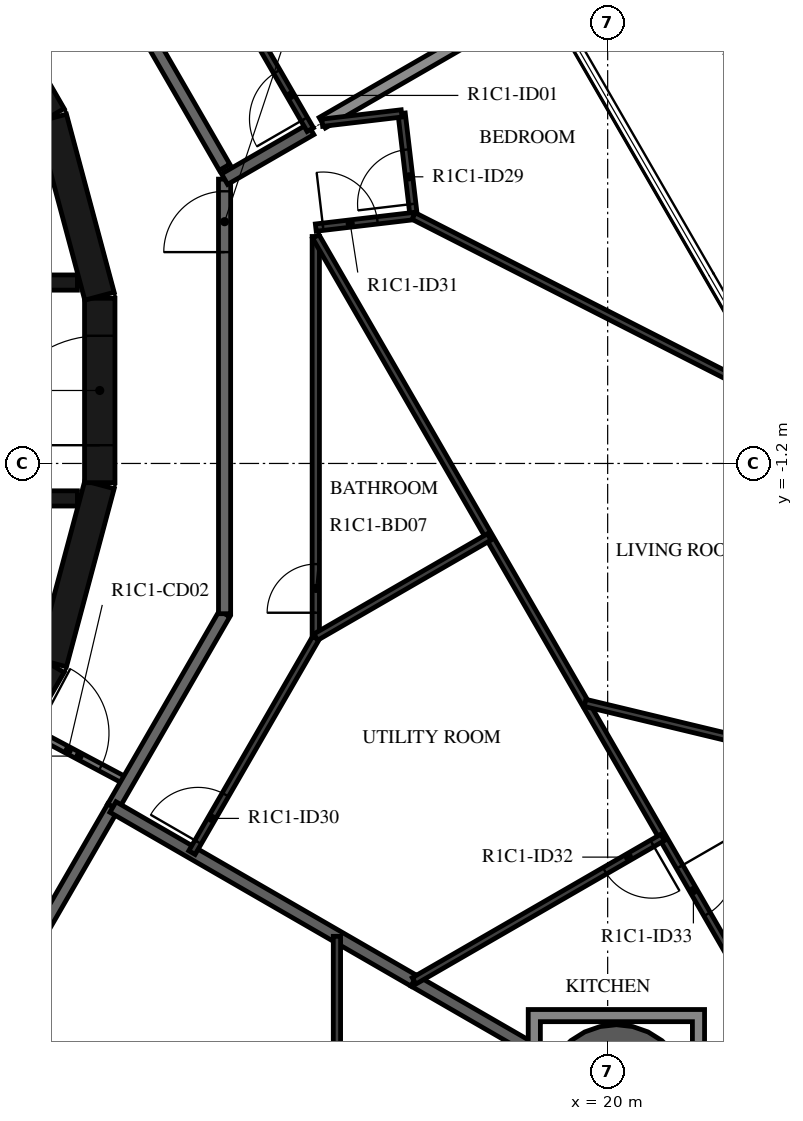
"""IFC4 building model, lengths in metres.
Left out: names, types, materials, properties, quantities, classifications, styles, units other than length and angle.
Written with IfcOpenShell. Run it as: python <this file> out.ifc"""

import sys

from ifc_helpers import new_model, si_unit, direction, frame, frame_2d, origin, origin_2d, place, context, subcontext, project, spatial, polyline, rectangle, hollow_circle, outline, extrude, element, fill, save


model = new_model("IFC4")
c1 = context("Model", 3, precision=1e-05, world=origin(), true_north=direction((0.0, 1.0)))
c2 = subcontext(c1, "Body", "Model", "MODEL_VIEW")
j1 = project(units=[si_unit("LENGTHUNIT", "METRE"), si_unit("PLANEANGLEUNIT", "RADIAN")], contexts=[c1])
p1 = place(None, origin())
s1 = spatial("IfcSite", under=j1, at=p1, CompositionType="ELEMENT")
p2 = place(p1, origin())
s2 = spatial("IfcBuilding", under=s1, at=p2, CompositionType="ELEMENT")
p3 = place(p2, frame((0.0, 0.0, 62.9)))
s3 = spatial("IfcBuildingStorey", under=s2, at=p3, CompositionType="ELEMENT", Elevation=62.9)
p4 = place(p3, frame((20.144, -11.63, -0.38), z_axis=(0.0, 0.0, 1.0), x_axis=(1.0, 0.0, 0.0)))
e1 = element("IfcColumn", 1, at=p4, inside=s3, PredefinedType="COLUMN", context=c2, shape_type="SweptSolid", body=[
    extrude(hollow_circle(Radius=1.2, WallThickness=0.06, at=origin_2d()), origin(), (0.0, 0.0, 1.0), 3.5),
])
for number, where, z_axis, x_axis in (
    (2, (9.329, -7.137, 0.0), (0.0, 0.0, 1.0), (0.5, 0.866, 0.0)),
    (3, (10.858, -4.479, 0.0), (0.0, 0.0, 1.0), (0.259, 0.966, 0.0)),
):
    element("IfcWall", number, at=place(p3, frame(where, z_axis=z_axis, x_axis=x_axis)), inside=s3, PredefinedType="SHEAR", context=c2, shape_type="SweptSolid", body=[
        extrude(rectangle(XDim=3.033, YDim=0.5, at=frame_2d((1.516, 0.0))), origin(), (0.0, 0.0, 1.0), 3.12),
    ])
p5 = place(p3, frame((11.647, -1.516, 0.0), z_axis=(0.0, 0.0, 1.0), x_axis=(0.0, 1.0, 0.0)))
e4 = element("IfcWall", 4, at=p5, inside=s3, PredefinedType="SHEAR", context=c2, shape_type="SweptSolid", body=[
    extrude(rectangle(XDim=3.033, YDim=0.5, at=frame_2d((1.516, 0.0))), origin(), (0.0, 0.0, 1.0), 3.12),
])
p6 = place(p5, frame((0.616, 0.0, 0.0)))
e5 = element("IfcOpeningElement", 5, at=p6, cuts=e4, PredefinedType="OPENING", context=c2, shape_type="SweptSolid", body=[
    extrude(rectangle(XDim=1.8, YDim=2.1, at=frame_2d((0.9, 1.05))), frame((0.0, 0.26, 0.0), z_axis=(0.0, -1.0, 0.0), x_axis=(1.0, 0.0, 0.0)), (0.0, 0.0, 1.0), 0.52),
])
for number, where, z_axis, x_axis in (
    (6, (11.643, 1.55, 0.0), (0.0, 0.0, 1.0), (-0.259, 0.966, 0.0)),
    (7, (10.845, 4.51, 0.0), (0.0, 0.0, 1.0), (-0.5, 0.866, 0.0)),
):
    element("IfcWall", number, at=place(p3, frame(where, z_axis=z_axis, x_axis=x_axis)), inside=s3, PredefinedType="SHEAR", context=c2, shape_type="SweptSolid", body=[
        extrude(rectangle(XDim=3.033, YDim=0.5, at=frame_2d((1.516, 0.0))), origin(), (0.0, 0.0, 1.0), 3.12),
    ])
p7 = place(p3, frame((3.35, 1.775, 0.0), z_axis=(0.0, 0.0, 1.0), x_axis=(1.0, 0.0, 0.0)))
e8 = element("IfcWall", 8, at=p7, inside=s3, PredefinedType="SHEAR", context=c2, shape_type="SweptSolid", body=[
    extrude(rectangle(XDim=7.93, YDim=0.25, at=frame_2d((3.965, 0.0))), origin(), (0.0, 0.0, 1.0), 3.12),
])
p8 = place(p7, frame((0.35, 0.0, 0.0)))
e9 = element("IfcOpeningElement", 9, at=p8, cuts=e8, PredefinedType="OPENING", context=c2, shape_type="SweptSolid", body=[
    extrude(rectangle(XDim=1.2, YDim=2.4, at=frame_2d((0.6, 1.2))), frame((0.0, 0.135, 0.0), z_axis=(0.0, -1.0, 0.0), x_axis=(1.0, 0.0, 0.0)), (0.0, 0.0, 1.0), 0.27),
])
p9 = place(p7, frame((2.5, 0.0, 0.0)))
e10 = element("IfcOpeningElement", 10, at=p9, cuts=e8, PredefinedType="OPENING", context=c2, shape_type="SweptSolid", body=[
    extrude(rectangle(XDim=1.2, YDim=2.4, at=frame_2d((0.6, 1.2))), frame((0.0, 0.135, 0.0), z_axis=(0.0, -1.0, 0.0), x_axis=(1.0, 0.0, 0.0)), (0.0, 0.0, 1.0), 0.27),
])
p10 = place(p7, frame((4.8, 0.0, 0.0)))
e11 = element("IfcOpeningElement", 11, at=p10, cuts=e8, PredefinedType="OPENING", context=c2, shape_type="SweptSolid", body=[
    extrude(rectangle(XDim=0.9, YDim=2.1, at=frame_2d((0.45, 1.05))), frame((0.0, 0.135, 0.0), z_axis=(0.0, -1.0, 0.0), x_axis=(1.0, 0.0, 0.0)), (0.0, 0.0, 1.0), 0.27),
])
p11 = place(p3, frame((3.35, -1.775, 0.0), z_axis=(0.0, 0.0, 1.0), x_axis=(1.0, 0.0, 0.0)))
e12 = element("IfcWall", 12, at=p11, inside=s3, PredefinedType="SHEAR", context=c2, shape_type="SweptSolid", body=[
    extrude(rectangle(XDim=7.93, YDim=0.25, at=frame_2d((3.965, 0.0))), origin(), (0.0, 0.0, 1.0), 3.12),
])
p12 = place(p11, frame((0.4, 0.0, 0.0)))
e13 = element("IfcOpeningElement", 13, at=p12, cuts=e12, PredefinedType="OPENING", context=c2, shape_type="SweptSolid", body=[
    extrude(rectangle(XDim=1.1, YDim=2.4, at=frame_2d((0.55, 1.2))), frame((0.0, 0.135, 0.0), z_axis=(0.0, -1.0, 0.0), x_axis=(1.0, 0.0, 0.0)), (0.0, 0.0, 1.0), 0.27),
])
p13 = place(p11, frame((2.55, 0.0, 0.0)))
e14 = element("IfcOpeningElement", 14, at=p13, cuts=e12, PredefinedType="OPENING", context=c2, shape_type="SweptSolid", body=[
    extrude(rectangle(XDim=1.1, YDim=2.4, at=frame_2d((0.55, 1.2))), frame((0.0, 0.135, 0.0), z_axis=(0.0, -1.0, 0.0), x_axis=(1.0, 0.0, 0.0)), (0.0, 0.0, 1.0), 0.27),
])
p14 = place(p11, frame((4.7, 0.0, 0.0)))
e15 = element("IfcOpeningElement", 15, at=p14, cuts=e12, PredefinedType="OPENING", context=c2, shape_type="SweptSolid", body=[
    extrude(rectangle(XDim=1.1, YDim=2.4, at=frame_2d((0.55, 1.2))), frame((0.0, 0.135, 0.0), z_axis=(0.0, -1.0, 0.0), x_axis=(1.0, 0.0, 0.0)), (0.0, 0.0, 1.0), 0.27),
])
p15 = place(p3, frame((10.511, -5.589, 0.0), z_axis=(0.0, 0.0, 1.0), x_axis=(0.88294043061, -0.469485032769, 0.0)))
e16 = element("IfcWall", 16, at=p15, inside=s3, PredefinedType="PARTITIONING", context=c2, shape_type="SweptSolid", body=[
    extrude(rectangle(XDim=1.804, YDim=0.12, at=frame_2d((0.902, 0.0))), origin(), (0.0, 0.0, 1.0), 3.12),
])
p16 = place(p15, frame((0.1, 0.0, 0.0)))
e17 = element("IfcOpeningElement", 17, at=p16, cuts=e16, PredefinedType="OPENING", context=c2, shape_type="SweptSolid", body=[
    extrude(rectangle(XDim=1.2, YDim=2.1, at=frame_2d((0.6, 1.05))), frame((0.0, 0.07, 0.0), z_axis=(0.0, -1.0, 0.0), x_axis=(1.0, 0.0, 0.0)), (0.0, 0.0, 1.0), 0.14),
])
p17 = place(p3, frame((13.7, 3.671, 0.0), z_axis=(0.0, 0.0, 1.0), x_axis=(-0.500001669485, 0.866024439905, 0.0)))
e18 = element("IfcWall", 18, at=p17, inside=s3, PredefinedType="STANDARD", context=c2, shape_type="SweptSolid", body=[
    extrude(rectangle(XDim=7.342, YDim=0.2, at=frame_2d((3.671, 0.0))), origin(), (0.0, 0.0, 1.0), 3.12),
])
p18 = place(p17, frame((6.142, 0.0, 0.0)))
e19 = element("IfcOpeningElement", 19, at=p18, cuts=e18, PredefinedType="OPENING", context=c2, shape_type="SweptSolid", body=[
    extrude(rectangle(XDim=1.0, YDim=2.1, at=frame_2d((0.5, 1.05))), frame((0.0, 0.11, 0.0), z_axis=(0.0, -1.0, 0.0), x_axis=(1.0, 0.0, 0.0)), (0.0, 0.0, 1.0), 0.22),
])
p19 = place(p3, frame((11.865, -6.85, 0.0), z_axis=(0.0, 0.0, 1.0), x_axis=(0.499987270552, 0.86603275301, 0.0)))
e20 = element("IfcWall", 20, at=p19, inside=s3, PredefinedType="STANDARD", context=c2, shape_type="SweptSolid", body=[
    extrude(rectangle(XDim=3.671, YDim=0.2, at=frame_2d((1.835, 0.0))), origin(), (0.0, 0.0, 1.0), 3.12),
])
p20 = place(p3, frame((13.7, -3.671, 0.0), z_axis=(0.0, 0.0, 1.0), x_axis=(0.0, 1.0, 0.0)))
e21 = element("IfcWall", 21, at=p20, inside=s3, PredefinedType="STANDARD", context=c2, shape_type="SweptSolid", body=[
    extrude(rectangle(XDim=7.146, YDim=0.2, at=frame_2d((3.573, 0.0))), origin(), (0.0, 0.0, 1.0), 3.12),
])
p21 = place(p20, frame((5.947, 0.0, 0.0)))
e22 = element("IfcOpeningElement", 22, at=p21, cuts=e21, PredefinedType="OPENING", context=c2, shape_type="SweptSolid", body=[
    extrude(rectangle(XDim=1.0, YDim=2.1, at=frame_2d((0.5, 1.05))), frame((0.0, 0.11, 0.0), z_axis=(0.0, -1.0, 0.0), x_axis=(1.0, 0.0, 0.0)), (0.0, 0.0, 1.0), 0.22),
])
p22 = place(p3, frame((10.029, -10.029, 0.0), z_axis=(0.0, 0.0, 1.0), x_axis=(0.50001606911, 0.866016126081, 0.0)))
e23 = element("IfcWall", 23, at=p22, inside=s3, PredefinedType="STANDARD", context=c2, shape_type="SweptSolid", body=[
    extrude(rectangle(XDim=3.671, YDim=0.2, at=frame_2d((1.835, 0.0))), origin(), (0.0, 0.0, 1.0), 3.12),
])
p23 = place(p3, frame((13.7, 3.476, 0.0), z_axis=(0.0, 0.0, 1.0), x_axis=(0.866014281772, 0.500019263395, 0.0)))
e24 = element("IfcWall", 24, at=p23, inside=s3, PredefinedType="STANDARD", context=c2, shape_type="SweptSolid", body=[
    extrude(rectangle(XDim=1.638, YDim=0.2, at=frame_2d((0.819, 0.0))), origin(), (0.0, 0.0, 1.0), 3.12),
])
p24 = place(p3, frame((15.306, 4.403, 0.0), z_axis=(0.0, 0.0, 1.0), x_axis=(0.866013143551, 0.500021234745, 0.0)))
e25 = element("IfcWall", 25, at=p24, inside=s3, PredefinedType="STANDARD", context=c2, shape_type="SweptSolid", body=[
    extrude(rectangle(XDim=4.173, YDim=0.2, at=frame_2d((2.086, 0.0))), origin(), (0.0, 0.0, 1.0), 2.73),
])
p25 = place(p3, frame((16.817, -9.709, 0.0), z_axis=(0.0, 0.0, 1.0), x_axis=(-0.86604338933, 0.499968846828, 0.0)))
e26 = element("IfcWall", 26, at=p25, inside=s3, PredefinedType="STANDARD", context=c2, shape_type="SweptSolid", body=[
    extrude(rectangle(XDim=5.718, YDim=0.2, at=frame_2d((2.859, 0.0))), origin(), (0.0, 0.0, 1.0), 3.12),
])
p26 = place(p3, frame((18.694, -10.793, 0.0), z_axis=(0.0, 0.0, 1.0), x_axis=(-0.866009251978, 0.500027974705, 0.0)))
e27 = element("IfcWall", 27, at=p26, inside=s3, PredefinedType="STANDARD", context=c2, shape_type="SweptSolid", body=[
    extrude(rectangle(XDim=2.167, YDim=0.2, at=frame_2d((1.084, 0.0))), origin(), (0.0, 0.0, 1.0), 3.12),
])
p27 = place(p3, frame((15.11, 4.289, 0.0), z_axis=(0.0, 0.0, 1.0), x_axis=(-0.500033654285, 0.866005972602, 0.0)))
e28 = element("IfcWall", 28, at=p27, inside=s3, PredefinedType="PARTITIONING", context=c2, shape_type="SweptSolid", body=[
    extrude(rectangle(XDim=5.003, YDim=0.12, at=frame_2d((2.501, 0.0))), origin(), (0.0, 0.0, 1.0), 3.12),
])
p28 = place(p27, frame((0.2, 0.0, 0.0)))
e29 = element("IfcOpeningElement", 29, at=p28, cuts=e28, PredefinedType="OPENING", context=c2, shape_type="SweptSolid", body=[
    extrude(rectangle(XDim=0.9, YDim=2.1, at=frame_2d((0.45, 1.05))), frame((0.0, 0.07, 0.0), z_axis=(0.0, -1.0, 0.0), x_axis=(1.0, 0.0, 0.0)), (0.0, 0.0, 1.0), 0.14),
])
p29 = place(p3, frame((15.548, -15.23, 0.0), z_axis=(0.0, 0.0, 1.0), x_axis=(0.0, 1.0, 0.0)))
e30 = element("IfcWall", 30, at=p29, inside=s3, PredefinedType="PARTITIONING", context=c2, shape_type="SweptSolid", body=[
    extrude(rectangle(XDim=6.253, YDim=0.12, at=frame_2d((3.127, 0.0))), origin(), (0.0, 0.0, 1.0), 3.12),
])
p30 = place(p29, frame((0.2, 0.0, 0.0)))
e31 = element("IfcOpeningElement", 31, at=p30, cuts=e30, PredefinedType="OPENING", context=c2, shape_type="SweptSolid", body=[
    extrude(rectangle(XDim=0.9, YDim=2.1, at=frame_2d((0.45, 1.05))), frame((0.0, 0.07, 0.0), z_axis=(0.0, -1.0, 0.0), x_axis=(1.0, 0.0, 0.0)), (0.0, 0.0, 1.0), 0.14),
])
p31 = place(p3, frame((16.81, 2.868, 0.0), z_axis=(0.0, 0.0, 1.0), x_axis=(-0.117049566217, 0.993126074096, 0.0)))
e32 = element("IfcWall", 32, at=p31, inside=s3, PredefinedType="PARTITIONING", context=c2, shape_type="SweptSolid", body=[
    extrude(rectangle(XDim=1.7, YDim=0.12, at=frame_2d((0.85, 0.0))), origin(), (0.0, 0.0, 1.0), 3.12),
])
p32 = place(p31, frame((0.2, 0.0, 0.0)))
e33 = element("IfcOpeningElement", 33, at=p32, cuts=e32, PredefinedType="OPENING", context=c2, shape_type="SweptSolid", body=[
    extrude(rectangle(XDim=0.9, YDim=2.1, at=frame_2d((0.45, 1.05))), frame((0.0, 0.07, 0.0), z_axis=(0.0, -1.0, 0.0), x_axis=(1.0, 0.0, 0.0)), (0.0, 0.0, 1.0), 0.14),
])
p33 = place(p3, frame((16.611, 4.556, 0.0), z_axis=(0.0, 0.0, 1.0), x_axis=(-0.993151872114, -0.116830470836, 0.0)))
e34 = element("IfcWall", 34, at=p33, inside=s3, PredefinedType="PARTITIONING", context=c2, shape_type="SweptSolid", body=[
    extrude(rectangle(XDim=1.314, YDim=0.12, at=frame_2d((0.657, 0.0))), origin(), (0.0, 0.0, 1.0), 3.12),
])
p34 = place(p3, frame((13.164, -7.6, 0.0), z_axis=(0.0, 0.0, 1.0), x_axis=(0.499974973053, 0.866039852617, 0.0)))
e35 = element("IfcWall", 35, at=p34, inside=s3, PredefinedType="PARTITIONING", context=c2, shape_type="SweptSolid", body=[
    extrude(rectangle(XDim=4.073, YDim=0.12, at=frame_2d((2.037, 0.0))), origin(), (0.0, 0.0, 1.0), 3.12),
])
p35 = place(p34, frame((0.2, 0.0, 0.0)))
e36 = element("IfcOpeningElement", 36, at=p35, cuts=e35, PredefinedType="OPENING", context=c2, shape_type="SweptSolid", body=[
    extrude(rectangle(XDim=0.9, YDim=2.1, at=frame_2d((0.45, 1.05))), frame((0.0, 0.07, 0.0), z_axis=(0.0, -1.0, 0.0), x_axis=(1.0, 0.0, 0.0)), (0.0, 0.0, 1.0), 0.14),
])
p36 = place(p3, frame((15.2, 2.679, 0.0), z_axis=(0.0, 0.0, 1.0), x_axis=(0.993150604323, 0.116841247567, 0.0)))
e37 = element("IfcWall", 37, at=p36, inside=s3, PredefinedType="PARTITIONING", context=c2, shape_type="SweptSolid", body=[
    extrude(rectangle(XDim=1.621, YDim=0.12, at=frame_2d((0.811, 0.0))), origin(), (0.0, 0.0, 1.0), 3.12),
])
p37 = place(p36, frame((0.12, 0.0, 0.0)))
e38 = element("IfcOpeningElement", 38, at=p37, cuts=e37, PredefinedType="OPENING", context=c2, shape_type="SweptSolid", body=[
    extrude(rectangle(XDim=0.9, YDim=2.1, at=frame_2d((0.45, 1.05))), frame((0.0, 0.07, 0.0), z_axis=(0.0, -1.0, 0.0), x_axis=(1.0, 0.0, 0.0)), (0.0, 0.0, 1.0), 0.14),
])
p38 = place(p3, frame((15.2, -4.055, 0.0), z_axis=(0.0, 0.0, 1.0), x_axis=(0.0, 1.0, 0.0)))
e39 = element("IfcWall", 39, at=p38, inside=s3, PredefinedType="PARTITIONING", context=c2, shape_type="SweptSolid", body=[
    extrude(rectangle(XDim=6.588, YDim=0.12, at=frame_2d((3.294, 0.0))), origin(), (0.0, 0.0, 1.0), 3.12),
])
p39 = place(p38, frame((0.4, 0.0, 0.0)))
e40 = element("IfcOpeningElement", 40, at=p39, cuts=e39, PredefinedType="OPENING", context=c2, shape_type="SweptSolid", body=[
    extrude(rectangle(XDim=0.8, YDim=2.1, at=frame_2d((0.4, 1.05))), frame((0.0, 0.07, 0.0), z_axis=(0.0, -1.0, 0.0), x_axis=(1.0, 0.0, 0.0)), (0.0, 0.0, 1.0), 0.14),
])
p40 = place(p3, frame((16.81, 2.868, 0.0), z_axis=(0.0, 0.0, 1.0), x_axis=(0.891097252128, -0.453812392128, 0.0)))
e41 = element("IfcWall", 41, at=p40, inside=s3, PredefinedType="PARTITIONING", context=c2, shape_type="SweptSolid", body=[
    extrude(rectangle(XDim=6.677, YDim=0.12, at=frame_2d((3.338, 0.0))), origin(), (0.0, 0.0, 1.0), 3.12),
])
p41 = place(p3, frame((15.2, 2.533, 0.0), z_axis=(0.0, 0.0, 1.0), x_axis=(0.500001127339, -0.866024752914, 0.0)))
e42 = element("IfcWall", 42, at=p41, inside=s3, PredefinedType="PARTITIONING", context=c2, shape_type="SweptSolid", body=[
    extrude(rectangle(XDim=14.434, YDim=0.12, at=frame_2d((7.217, 0.0))), origin(), (0.0, 0.0, 1.0), 3.12),
])
p42 = place(p41, frame((11.97, 0.0, 0.0)))
e43 = element("IfcOpeningElement", 43, at=p42, cuts=e42, PredefinedType="OPENING", context=c2, shape_type="SweptSolid", body=[
    extrude(rectangle(XDim=0.9, YDim=2.1, at=frame_2d((0.45, 1.05))), frame((0.0, 0.07, 0.0), z_axis=(0.0, -1.0, 0.0), x_axis=(1.0, 0.0, 0.0)), (0.0, 0.0, 1.0), 0.14),
])
p43 = place(p3, frame((20.905, -7.349, 0.0), z_axis=(0.0, 0.0, 1.0), x_axis=(-0.866032292145, -0.49998806882, 0.0)))
e44 = element("IfcWall", 44, at=p43, inside=s3, PredefinedType="PARTITIONING", context=c2, shape_type="SweptSolid", body=[
    extrude(rectangle(XDim=4.721, YDim=0.12, at=frame_2d((2.36, 0.0))), origin(), (0.0, 0.0, 1.0), 3.12),
])
p44 = place(p43, frame((0.2, 0.0, 0.0)))
e45 = element("IfcOpeningElement", 45, at=p44, cuts=e44, PredefinedType="OPENING", context=c2, shape_type="SweptSolid", body=[
    extrude(rectangle(XDim=0.9, YDim=2.1, at=frame_2d((0.45, 1.05))), frame((0.0, 0.07, 0.0), z_axis=(0.0, -1.0, 0.0), x_axis=(1.0, 0.0, 0.0)), (0.0, 0.0, 1.0), 0.14),
])
p45 = place(p3, frame((18.052, -2.408, 0.0), z_axis=(0.0, 0.0, 1.0), x_axis=(-0.866017718408, -0.500013311227, 0.0)))
e46 = element("IfcWall", 46, at=p45, inside=s3, PredefinedType="PARTITIONING", context=c2, shape_type="SweptSolid", body=[
    extrude(rectangle(XDim=3.294, YDim=0.12, at=frame_2d((1.647, 0.0))), origin(), (0.0, 0.0, 1.0), 3.12),
])
p46 = place(p3, frame((26.6, -6.813, 0.0), z_axis=(0.0, 0.0, 1.0), x_axis=(-0.972307508101, 0.23370517686, 0.0)))
e47 = element("IfcWall", 47, at=p46, inside=s3, PredefinedType="PARTITIONING", context=c2, shape_type="SweptSolid", body=[
    extrude(rectangle(XDim=7.17, YDim=0.12, at=frame_2d((3.585, 0.0))), origin(), (0.0, 0.0, 1.0), 3.12),
])
p47 = place(p3, origin())
e48 = element("IfcWall", 48, at=p47, inside=s3, PredefinedType="STANDARD", context=c2, shape_type="SweptSolid", body=[
    extrude(outline(polyline([(21.594, -10.18), (21.594, -13.08), (18.694, -13.08), (18.694, -10.18), (21.594, -10.18)]), holes=[polyline([(18.894, -12.88), (21.394, -12.88), (21.394, -10.38), (18.894, -10.38), (18.894, -12.88)])]), origin(), (0.0, 0.0, 1.0), 3.12),
])
p48 = place(p6, origin())
e49 = element("IfcDoor", 49, at=p48, inside=s3, OperationType="DOUBLE_DOOR_SINGLE_SWING", PredefinedType="DOOR", context=c2, shape_type="SweptSolid", body=[
    extrude(rectangle(XDim=1.8, YDim=2.1, at=frame_2d((0.9, 1.05))), frame((0.0, 0.025, 0.0), z_axis=(0.0, -1.0, 0.0), x_axis=(1.0, 0.0, 0.0)), (0.0, 0.0, 1.0), 0.05),
])
fill(e5, e49)
p49 = place(p28, origin())
e50 = element("IfcDoor", 50, at=p49, inside=s3, OperationType="SINGLE_SWING_LEFT", PredefinedType="DOOR", context=c2, shape_type="SweptSolid", body=[
    extrude(rectangle(XDim=0.9, YDim=2.1, at=frame_2d((0.45, 1.05))), frame((0.0, 0.025, 0.0), z_axis=(0.0, -1.0, 0.0), x_axis=(1.0, 0.0, 0.0)), (0.0, 0.0, 1.0), 0.05),
])
fill(e29, e50)
p50 = place(p21, origin())
e51 = element("IfcDoor", 51, at=p50, inside=s3, OperationType="SINGLE_SWING_LEFT", PredefinedType="DOOR", context=c2, shape_type="SweptSolid", body=[
    extrude(rectangle(XDim=1.0, YDim=2.1, at=frame_2d((0.5, 1.05))), frame((0.0, 0.025, 0.0), z_axis=(0.0, -1.0, 0.0), x_axis=(1.0, 0.0, 0.0)), (0.0, 0.0, 1.0), 0.05),
])
fill(e22, e51)
p51 = place(p32, origin())
e52 = element("IfcDoor", 52, at=p51, inside=s3, OperationType="SINGLE_SWING_LEFT", PredefinedType="DOOR", context=c2, shape_type="SweptSolid", body=[
    extrude(rectangle(XDim=0.9, YDim=2.1, at=frame_2d((0.45, 1.05))), frame((0.0, 0.025, 0.0), z_axis=(0.0, -1.0, 0.0), x_axis=(1.0, 0.0, 0.0)), (0.0, 0.0, 1.0), 0.05),
])
fill(e33, e52)
p52 = place(p35, origin())
e53 = element("IfcDoor", 53, at=p52, inside=s3, OperationType="SINGLE_SWING_LEFT", PredefinedType="DOOR", context=c2, shape_type="SweptSolid", body=[
    extrude(rectangle(XDim=0.9, YDim=2.1, at=frame_2d((0.45, 1.05))), frame((0.0, 0.025, 0.0), z_axis=(0.0, -1.0, 0.0), x_axis=(1.0, 0.0, 0.0)), (0.0, 0.0, 1.0), 0.05),
])
fill(e36, e53)
p53 = place(p37, origin())
e54 = element("IfcDoor", 54, at=p53, inside=s3, OperationType="SINGLE_SWING_RIGHT", PredefinedType="DOOR", context=c2, shape_type="SweptSolid", body=[
    extrude(rectangle(XDim=0.9, YDim=2.1, at=frame_2d((0.45, 1.05))), frame((0.0, 0.025, 0.0), z_axis=(0.0, -1.0, 0.0), x_axis=(1.0, 0.0, 0.0)), (0.0, 0.0, 1.0), 0.05),
])
fill(e38, e54)
p54 = place(p39, origin())
e55 = element("IfcDoor", 55, at=p54, inside=s3, OperationType="SINGLE_SWING_LEFT", PredefinedType="DOOR", context=c2, shape_type="SweptSolid", body=[
    extrude(rectangle(XDim=0.8, YDim=2.1, at=frame_2d((0.4, 1.05))), frame((0.0, 0.025, 0.0), z_axis=(0.0, -1.0, 0.0), x_axis=(1.0, 0.0, 0.0)), (0.0, 0.0, 1.0), 0.05),
])
fill(e40, e55)
p55 = place(p44, origin())
e56 = element("IfcDoor", 56, at=p55, inside=s3, OperationType="SINGLE_SWING_LEFT", PredefinedType="DOOR", context=c2, shape_type="SweptSolid", body=[
    extrude(rectangle(XDim=0.9, YDim=2.1, at=frame_2d((0.45, 1.05))), frame((0.0, 0.025, 0.0), z_axis=(0.0, -1.0, 0.0), x_axis=(1.0, 0.0, 0.0)), (0.0, 0.0, 1.0), 0.05),
])
fill(e45, e56)
p56 = place(p42, origin())
e57 = element("IfcDoor", 57, at=p56, inside=s3, OperationType="SINGLE_SWING_LEFT", PredefinedType="DOOR", context=c2, shape_type="SweptSolid", body=[
    extrude(rectangle(XDim=0.9, YDim=2.1, at=frame_2d((0.45, 1.05))), frame((0.0, 0.025, 0.0), z_axis=(0.0, -1.0, 0.0), x_axis=(1.0, 0.0, 0.0)), (0.0, 0.0, 1.0), 0.05),
])
fill(e43, e57)
p57 = place(p16, origin())
e58 = element("IfcDoor", 58, at=p57, inside=s3, OperationType="DOUBLE_DOOR_SINGLE_SWING", PredefinedType="DOOR", context=c2, shape_type="SweptSolid", body=[
    extrude(rectangle(XDim=1.2, YDim=2.1, at=frame_2d((0.6, 1.05))), frame((0.0, 0.025, 0.0), z_axis=(0.0, -1.0, 0.0), x_axis=(1.0, 0.0, 0.0)), (0.0, 0.0, 1.0), 0.05),
])
fill(e17, e58)
save(model, sys.argv[1])
